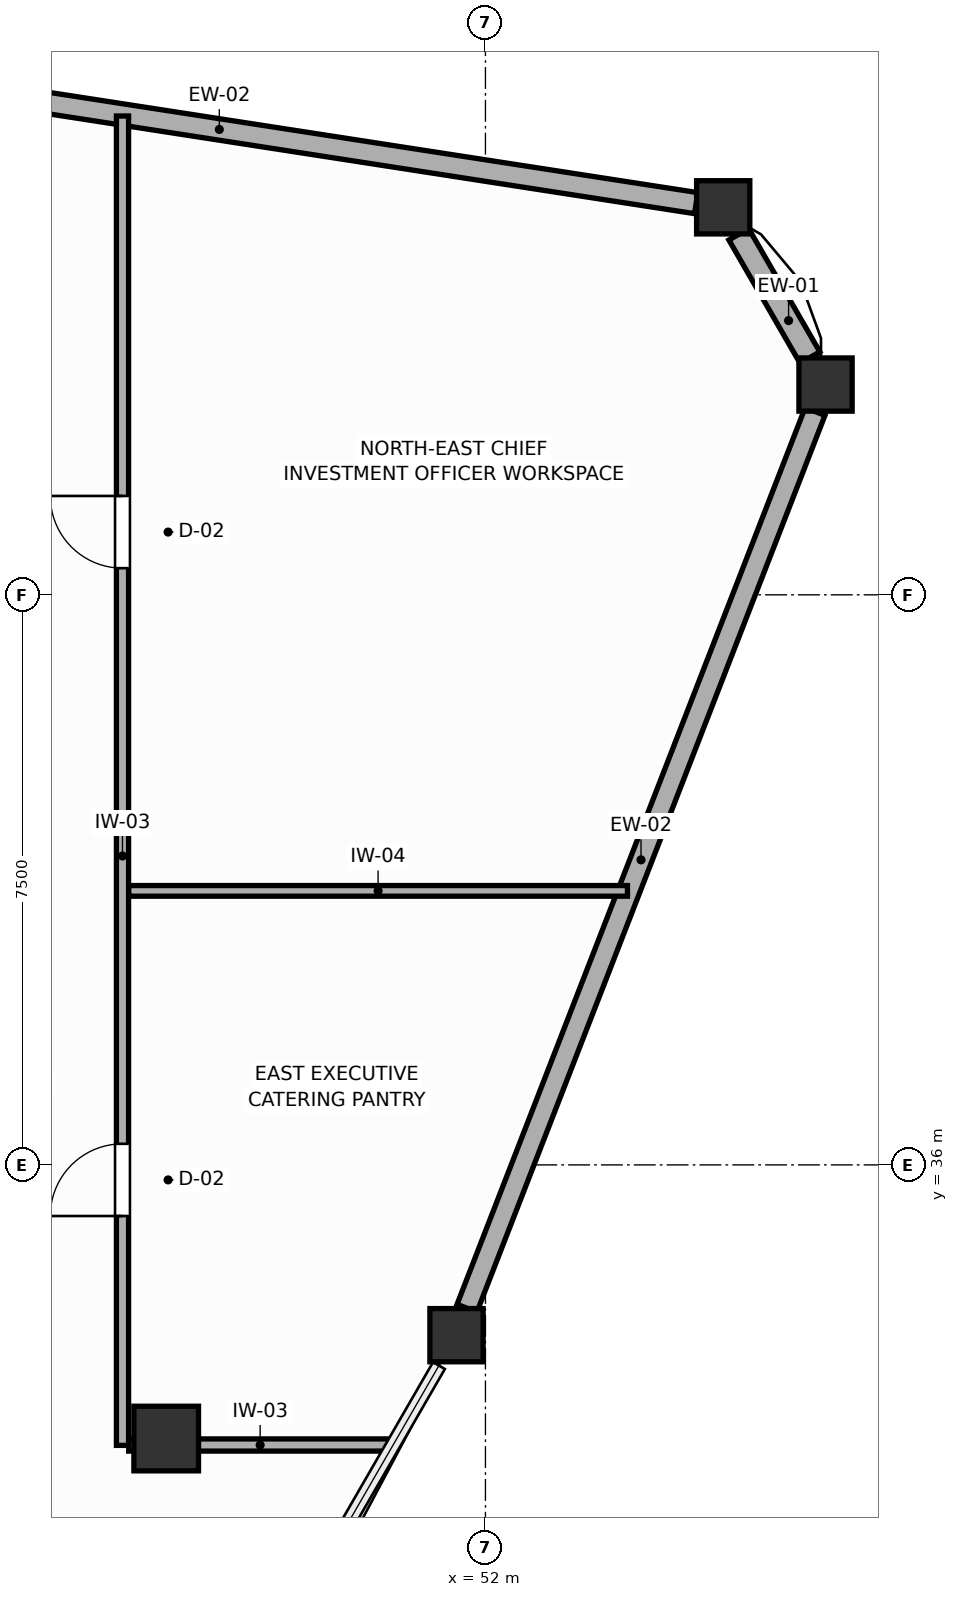
"""IFC4 building model, lengths in metres.
Left out: names, types, materials, properties, quantities, classifications, styles, units other than length and angle.
Written with IfcOpenShell. Run it as: python <this file> out.ifc"""

import sys

from ifc_helpers import new_model, si_unit, direction, frame, frame_2d, origin, origin_2d, place, context, subcontext, project, spatial, rectangle, extrude, source, transform, mapped, element, fill, save


model = new_model("IFC4")
c1 = context("Model", 3, precision=1e-05, world=origin(), true_north=direction((0.0, 1.0)))
c2 = subcontext(c1, "Body", "Model", "MODEL_VIEW")
j1 = project(units=[si_unit("LENGTHUNIT", "METRE"), si_unit("PLANEANGLEUNIT", "RADIAN")], contexts=[c1])
p1 = place(None, origin())
s1 = spatial("IfcSite", under=j1, at=p1, CompositionType="ELEMENT")
p2 = place(p1, origin())
s2 = spatial("IfcBuilding", under=s1, at=p2, CompositionType="ELEMENT")
p3 = place(p2, frame((0.0, 0.0, 268.2)))
s3 = spatial("IfcBuildingStorey", under=s2, at=p3, CompositionType="ELEMENT", Elevation=268.2)
m1 = source(origin(), c2, "Body", "SweptSolid", [
    extrude(rectangle(XDim=0.85, YDim=0.85, at=origin_2d()), origin(), (0.0, 0.0, 1.0), 3.6),
])
p4 = place(p3, frame((47.8, 32.4, 0.0), z_axis=(0.0, 0.0, 1.0), x_axis=(1.0, 0.0, 0.0)))
e1 = element("IfcColumn", 1, at=p4, inside=s3, PredefinedType="COLUMN", context=c2, shape_type="MappedRepresentation", body=[
    mapped(m1, transform((0.0, 0.0, 0.0), scale=1.0)),
])
m2 = source(origin(), c2, "Body", "SweptSolid", [
    extrude(rectangle(XDim=0.7, YDim=0.7, at=origin_2d()), origin(), (0.0, 0.0, 1.0), 3.6),
])
for number, where, z_axis, x_axis in (
    (2, (56.474, 46.266, 0.0), (0.0, 0.0, 1.0), (1.0, 0.0, 0.0)),
    (3, (55.128, 48.598, 0.0), (0.0, 0.0, 1.0), (1.0, 0.0, 0.0)),
    (4, (51.619, 33.76, 0.0), (0.0, 0.0, 1.0), (1.0, 0.0, 0.0)),
):
    element("IfcColumn", number, at=place(p3, frame(where, z_axis=z_axis, x_axis=x_axis)), inside=s3, PredefinedType="COLUMN", context=c2, shape_type="MappedRepresentation", body=[
        mapped(m2, transform((0.0, 0.0, 0.0), scale=1.0)),
    ])
p5 = place(p3, frame((56.269, 46.621, 0.0), z_axis=(0.0, 0.0, 1.0), x_axis=(-0.500023421257, 0.866011881093, 0.0)))
e5 = element("IfcWall", 5, at=p5, inside=s3, PredefinedType="SOLIDWALL", context=c2, shape_type="SweptSolid", body=[
    extrude(rectangle(XDim=1.873, YDim=0.3, at=frame_2d((0.936, 0.0))), origin(), (0.0, 0.0, 1.0), 3.08),
])
p6 = place(p3, frame((54.773, 48.653, 0.0), z_axis=(0.0, 0.0, 1.0), x_axis=(-0.988271454673, 0.152707340617, 0.0)))
e6 = element("IfcWall", 6, at=p6, inside=s3, PredefinedType="SOLIDWALL", context=c2, shape_type="SweptSolid", body=[
    extrude(rectangle(XDim=12.697, YDim=0.28, at=frame_2d((6.349, 0.0))), origin(), (0.0, 0.0, 1.0), 3.08),
])
p7 = place(p3, frame((51.757, 34.115, 0.0), z_axis=(0.0, 0.0, 1.0), x_axis=(0.3618810561, 0.932224276253, 0.0)))
e7 = element("IfcWall", 7, at=p7, inside=s3, PredefinedType="SOLIDWALL", context=c2, shape_type="SweptSolid", body=[
    extrude(rectangle(XDim=12.654, YDim=0.28, at=frame_2d((6.327, 0.0))), origin(), (0.0, 0.0, 1.0), 3.08),
])
p8 = place(p3, frame((47.225, 32.31, 0.0), z_axis=(0.0, 0.0, 1.0), x_axis=(0.0, 1.0, 0.0)))
e8 = element("IfcWall", 8, at=p8, inside=s3, PredefinedType="PARTITIONING", context=c2, shape_type="SweptSolid", body=[
    extrude(rectangle(XDim=17.489, YDim=0.16, at=frame_2d((8.745, 0.0))), origin(), (0.0, 0.0, 1.0), 3.41),
])
p9 = place(p8, frame((3.018, 0.0, 0.0)))
e9 = element("IfcOpeningElement", 9, at=p9, cuts=e8, PredefinedType="OPENING", context=c2, shape_type="SweptSolid", body=[
    extrude(rectangle(XDim=0.95, YDim=2.05, at=frame_2d((0.475, 1.025))), frame((0.0, 0.09, 0.0), z_axis=(0.0, -1.0, 0.0), x_axis=(1.0, 0.0, 0.0)), (0.0, 0.0, 1.0), 0.18),
])
p10 = place(p8, frame((11.541, 0.0, 0.0)))
e10 = element("IfcOpeningElement", 10, at=p10, cuts=e8, PredefinedType="OPENING", context=c2, shape_type="SweptSolid", body=[
    extrude(rectangle(XDim=0.95, YDim=2.05, at=frame_2d((0.475, 1.025))), frame((0.0, 0.09, 0.0), z_axis=(0.0, -1.0, 0.0), x_axis=(1.0, 0.0, 0.0)), (0.0, 0.0, 1.0), 0.18),
])
p11 = place(p3, frame((47.307, 32.315, 0.0), z_axis=(0.0, 0.0, 1.0), x_axis=(1.0, 0.0, 0.0)))
e11 = element("IfcWall", 11, at=p11, inside=s3, PredefinedType="PARTITIONING", context=c2, shape_type="SweptSolid", body=[
    extrude(rectangle(XDim=3.458, YDim=0.16, at=frame_2d((1.729, 0.0))), origin(), (0.0, 0.0, 1.0), 3.08),
])
p12 = place(p3, frame((47.307, 39.605, 0.0), z_axis=(0.0, 0.0, 1.0), x_axis=(1.0, 0.0, 0.0)))
e12 = element("IfcWall", 12, at=p12, inside=s3, PredefinedType="PARTITIONING", context=c2, shape_type="SweptSolid", body=[
    extrude(rectangle(XDim=6.562, YDim=0.14, at=frame_2d((3.281, 0.0))), origin(), (0.0, 0.0, 1.0), 3.41),
])
p13 = place(p9, origin())
e13 = element("IfcDoor", 13, at=p13, inside=s3, OperationType="SINGLE_SWING_LEFT", PredefinedType="DOOR", context=c2, shape_type="SweptSolid", body=[
    extrude(rectangle(XDim=0.95, YDim=2.05, at=frame_2d((0.475, 1.025))), frame((0.0, 0.025, 0.0), z_axis=(0.0, -1.0, 0.0), x_axis=(1.0, 0.0, 0.0)), (0.0, 0.0, 1.0), 0.05),
])
fill(e9, e13)
p14 = place(p10, origin())
e14 = element("IfcDoor", 14, at=p14, inside=s3, OperationType="SINGLE_SWING_RIGHT", PredefinedType="DOOR", context=c2, shape_type="SweptSolid", body=[
    extrude(rectangle(XDim=0.95, YDim=2.05, at=frame_2d((0.475, 1.025))), frame((0.0, 0.025, 0.0), z_axis=(0.0, -1.0, 0.0), x_axis=(1.0, 0.0, 0.0)), (0.0, 0.0, 1.0), 0.05),
])
fill(e10, e14)
save(model, sys.argv[1])
